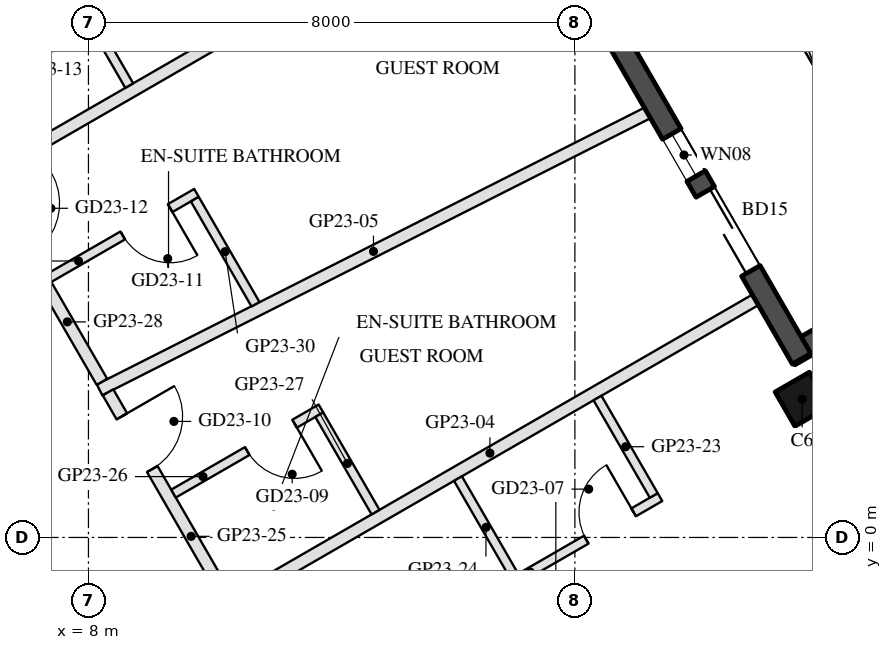
"""IFC4 building model, lengths in metres.
Left out: names, types, materials, properties, quantities, classifications, styles, units other than length and angle.
Written with IfcOpenShell. Run it as: python <this file> out.ifc"""

import sys

from ifc_helpers import new_model, si_unit, direction, frame, frame_2d, origin, origin_2d, place, context, subcontext, project, spatial, rectangle, hollow_rectangle, extrude, boolean, halfspace, element, fill, save


model = new_model("IFC4")
c1 = context("Model", 3, precision=1e-05, world=origin(), true_north=direction((0.0, 1.0)))
c2 = subcontext(c1, "Body", "Model", "MODEL_VIEW")
j1 = project(units=[si_unit("LENGTHUNIT", "METRE"), si_unit("PLANEANGLEUNIT", "RADIAN")], contexts=[c1])
p1 = place(None, origin())
s1 = spatial("IfcSite", under=j1, at=p1, CompositionType="ELEMENT")
p2 = place(p1, origin())
s2 = spatial("IfcBuilding", under=s1, at=p2, CompositionType="ELEMENT")
p3 = place(p2, frame((0.0, 0.0, 250.4)))
s3 = spatial("IfcBuildingStorey", under=s2, at=p3, CompositionType="ELEMENT", Elevation=250.4)
p4 = place(p3, frame((19.738, 2.273, 0.0), z_axis=(0.0, 0.0, 1.0), x_axis=(-0.5, 0.866025403784, 0.0)))
e1 = element("IfcColumn", 1, at=p4, inside=s3, PredefinedType="COLUMN", context=c2, shape_type="SweptSolid", body=[
    boolean("DIFFERENCE", extrude(hollow_rectangle(XDim=0.65, YDim=0.65, WallThickness=0.03, at=origin_2d()), origin(), (0.0, 0.0, 1.0), 3.7), halfspace(frame((0.0, 0.0, 3.66), z_axis=(0.0, 0.0, 1.0), x_axis=(1.0, 0.0, 0.0)), False)),
])
p5 = place(p3, frame((20.588, 3.601, 0.0), z_axis=(0.0, 0.0, 1.0), x_axis=(-0.866005645448, -0.500034220881, 0.0)))
e2 = element("IfcWall", 2, at=p5, inside=s3, PredefinedType="SOLIDWALL", context=c2, shape_type="SweptSolid", body=[
    extrude(rectangle(XDim=1.22, YDim=0.35, at=frame_2d((0.61, 0.0))), origin(), (0.0, 0.0, 1.0), 3.55),
])
p6 = place(p3, frame((19.729, 2.938, 0.0), z_axis=(0.0, 0.0, 1.0), x_axis=(-0.499976430342, 0.866039011305, 0.0)))
e3 = element("IfcWall", 3, at=p6, inside=s3, PredefinedType="SOLIDWALL", context=c2, shape_type="SweptSolid", body=[
    extrude(rectangle(XDim=6.74, YDim=0.35, at=frame_2d((3.37, 0.0))), origin(), (0.0, 0.0, 1.0), 3.55),
])
p7 = place(p6, frame((1.67, 0.0, 0.0)))
e4 = element("IfcOpeningElement", 4, at=p7, cuts=e3, PredefinedType="OPENING", context=c2, shape_type="SweptSolid", body=[
    extrude(rectangle(XDim=1.5, YDim=2.4, at=frame_2d((0.75, 1.2))), frame((0.0, 0.185, 0.0), z_axis=(0.0, -1.0, 0.0), x_axis=(1.0, 0.0, 0.0)), (0.0, 0.0, 1.0), 0.37),
])
p8 = place(p6, frame((3.47, 0.0, 0.3)))
e5 = element("IfcOpeningElement", 5, at=p8, cuts=e3, PredefinedType="OPENING", context=c2, shape_type="SweptSolid", body=[
    extrude(rectangle(XDim=0.8, YDim=2.65, at=frame_2d((0.4, 1.325))), frame((0.0, 0.185, 0.0), z_axis=(0.0, -1.0, 0.0), x_axis=(1.0, 0.0, 0.0)), (0.0, 0.0, 1.0), 0.37),
])
p9 = place(p3, frame((18.968, 3.907, 0.0), z_axis=(0.0, 0.0, 1.0), x_axis=(-0.866022637375, -0.500004791531, 0.0)))
e6 = element("IfcWall", 6, at=p9, inside=s3, PredefinedType="PARTITIONING", context=c2, shape_type="SweptSolid", body=[
    extrude(rectangle(XDim=10.08, YDim=0.2, at=frame_2d((5.04, 0.0))), origin(), (0.0, 0.0, 1.0), 3.1),
])
p10 = place(p3, frame((17.192, 6.982, 0.0), z_axis=(0.0, 0.0, 1.0), x_axis=(-0.892469554868, -0.451107629766, 0.0)))
e7 = element("IfcWall", 7, at=p10, inside=s3, PredefinedType="PARTITIONING", context=c2, shape_type="SweptSolid", body=[
    extrude(rectangle(XDim=10.096, YDim=0.2, at=frame_2d((5.048, 0.0))), origin(), (0.0, 0.0, 1.0), 3.1),
])
p11 = place(p3, frame((15.697, 11.372, 0.0), z_axis=(0.0, 0.0, 1.0), x_axis=(-0.866027479907, -0.499996404033, 0.0)))
e8 = element("IfcWall", 8, at=p11, inside=s3, PredefinedType="PARTITIONING", context=c2, shape_type="SweptSolid", body=[
    extrude(rectangle(XDim=10.98, YDim=0.2, at=frame_2d((5.49, 0.0))), origin(), (0.0, 0.0, 1.0), 3.1),
])
p12 = place(p3, frame((14.974, -0.737, 0.0), z_axis=(0.0, 0.0, 1.0), x_axis=(0.866018616679, 0.500011755427, 0.0)))
e9 = element("IfcWall", 9, at=p12, inside=s3, PredefinedType="PARTITIONING", context=c2, shape_type="SweptSolid", body=[
    extrude(rectangle(XDim=2.8, YDim=0.15, at=frame_2d((1.4, 0.0))), origin(), (0.0, 0.0, 1.0), 3.55),
])
p13 = place(p12, frame((1.4, 0.0, 0.0)))
e10 = element("IfcOpeningElement", 10, at=p13, cuts=e9, PredefinedType="OPENING", context=c2, shape_type="SweptSolid", body=[
    extrude(rectangle(XDim=0.9, YDim=2.1, at=frame_2d((0.45, 1.05))), frame((0.0, 0.085, 0.0), z_axis=(0.0, -1.0, 0.0), x_axis=(1.0, 0.0, 0.0)), (0.0, 0.0, 1.0), 0.17),
])
p14 = place(p3, frame((17.297, 0.691, 0.0), z_axis=(0.0, 0.0, 1.0), x_axis=(-0.499985172903, 0.866033964044, 0.0)))
e11 = element("IfcWall", 11, at=p14, inside=s3, PredefinedType="PARTITIONING", context=c2, shape_type="SweptSolid", body=[
    extrude(rectangle(XDim=1.85, YDim=0.15, at=frame_2d((0.925, 0.0))), origin(), (0.0, 0.0, 1.0), 2.95),
])
p15 = place(p3, frame((15.002, -0.634, 0.0), z_axis=(0.0, 0.0, 1.0), x_axis=(-0.500042316284, 0.866000971088, 0.0)))
e12 = element("IfcWall", 12, at=p15, inside=s3, PredefinedType="PARTITIONING", context=c2, shape_type="SweptSolid", body=[
    extrude(rectangle(XDim=1.85, YDim=0.15, at=frame_2d((0.925, 0.0))), origin(), (0.0, 0.0, 1.0), 2.95),
])
p16 = place(p3, frame((8.322, 2.386, 0.0), z_axis=(0.0, 0.0, 1.0), x_axis=(0.499998439657, -0.866026304647, 0.0)))
e13 = element("IfcWall", 13, at=p16, inside=s3, PredefinedType="PARTITIONING", context=c2, shape_type="SweptSolid", body=[
    extrude(rectangle(XDim=3.905, YDim=0.2, at=frame_2d((1.953, 0.0))), origin(), (0.0, 0.0, 1.0), 2.95),
])
p17 = place(p16, frame((0.455, 0.0, 0.0)))
e14 = element("IfcOpeningElement", 14, at=p17, cuts=e13, PredefinedType="OPENING", context=c2, shape_type="SweptSolid", body=[
    extrude(rectangle(XDim=1.0, YDim=2.1, at=frame_2d((0.5, 1.05))), frame((0.0, 0.11, 0.0), z_axis=(0.0, -1.0, 0.0), x_axis=(1.0, 0.0, 0.0)), (0.0, 0.0, 1.0), 0.22),
])
p18 = place(p3, frame((11.823, 2.121, 0.0), z_axis=(0.0, 0.0, 1.0), x_axis=(-0.866034573852, -0.49998411664, 0.0)))
e15 = element("IfcWall", 15, at=p18, inside=s3, PredefinedType="PARTITIONING", context=c2, shape_type="SweptSolid", body=[
    extrude(rectangle(XDim=2.8, YDim=0.15, at=frame_2d((1.4, 0.0))), origin(), (0.0, 0.0, 1.0), 2.95),
])
p19 = place(p18, frame((0.5, 0.0, 0.0)))
e16 = element("IfcOpeningElement", 16, at=p19, cuts=e15, PredefinedType="OPENING", context=c2, shape_type="SweptSolid", body=[
    extrude(rectangle(XDim=0.9, YDim=2.1, at=frame_2d((0.45, 1.05))), frame((0.0, 0.085, 0.0), z_axis=(0.0, -1.0, 0.0), x_axis=(1.0, 0.0, 0.0)), (0.0, 0.0, 1.0), 0.17),
])
p20 = place(p3, frame((12.721, 0.416, 0.0), z_axis=(0.0, 0.0, 1.0), x_axis=(-0.499985172903, 0.866033964044, 0.0)))
e17 = element("IfcWall", 17, at=p20, inside=s3, PredefinedType="PARTITIONING", context=c2, shape_type="SweptSolid", body=[
    extrude(rectangle(XDim=1.85, YDim=0.15, at=frame_2d((0.925, 0.0))), origin(), (0.0, 0.0, 1.0), 3.55),
])
p21 = place(p3, frame((6.325, 5.845, 0.0), z_axis=(0.0, 0.0, 1.0), x_axis=(0.499973105789, -0.866040930607, 0.0)))
e18 = element("IfcWall", 18, at=p21, inside=s3, PredefinedType="PARTITIONING", context=c2, shape_type="SweptSolid", body=[
    extrude(rectangle(XDim=3.794, YDim=0.2, at=frame_2d((1.897, 0.0))), origin(), (0.0, 0.0, 1.0), 2.95),
])
p22 = place(p21, frame((0.403, 0.0, 0.0)))
e19 = element("IfcOpeningElement", 19, at=p22, cuts=e18, PredefinedType="OPENING", context=c2, shape_type="SweptSolid", body=[
    extrude(rectangle(XDim=1.0, YDim=2.1, at=frame_2d((0.5, 1.05))), frame((0.0, 0.11, 0.0), z_axis=(0.0, -1.0, 0.0), x_axis=(1.0, 0.0, 0.0)), (0.0, 0.0, 1.0), 0.22),
])
p23 = place(p3, frame((9.776, 5.667, 0.0), z_axis=(0.0, 0.0, 1.0), x_axis=(-0.866034573852, -0.49998411664, 0.0)))
e20 = element("IfcWall", 20, at=p23, inside=s3, PredefinedType="PARTITIONING", context=c2, shape_type="SweptSolid", body=[
    extrude(rectangle(XDim=2.8, YDim=0.15, at=frame_2d((1.4, 0.0))), origin(), (0.0, 0.0, 1.0), 2.95),
])
p24 = place(p23, frame((0.5, 0.0, 0.0)))
e21 = element("IfcOpeningElement", 21, at=p24, cuts=e20, PredefinedType="OPENING", context=c2, shape_type="SweptSolid", body=[
    extrude(rectangle(XDim=0.9, YDim=2.1, at=frame_2d((0.45, 1.05))), frame((0.0, 0.085, 0.0), z_axis=(0.0, -1.0, 0.0), x_axis=(1.0, 0.0, 0.0)), (0.0, 0.0, 1.0), 0.17),
])
p25 = place(p3, frame((10.747, 3.836, 0.0), z_axis=(0.0, 0.0, 1.0), x_axis=(-0.499980071345, 0.866036909293, 0.0)))
e22 = element("IfcWall", 22, at=p25, inside=s3, PredefinedType="PARTITIONING", context=c2, shape_type="SweptSolid", body=[
    extrude(rectangle(XDim=1.996, YDim=0.15, at=frame_2d((0.998, 0.0))), origin(), (0.0, 0.0, 1.0), 2.95),
])
p26 = place(p3, frame((7.774, 9.136, 0.0), z_axis=(0.0, 0.0, 1.0), x_axis=(-0.866056369097, -0.49994636267, 0.0)))
e23 = element("IfcWall", 23, at=p26, inside=s3, PredefinedType="PARTITIONING", context=c2, shape_type="SweptSolid", body=[
    extrude(rectangle(XDim=2.8, YDim=0.15, at=frame_2d((1.4, 0.0))), origin(), (0.0, 0.0, 1.0), 2.95),
])
p27 = place(p26, frame((0.5, 0.0, 0.0)))
e24 = element("IfcOpeningElement", 24, at=p27, cuts=e23, PredefinedType="OPENING", context=c2, shape_type="SweptSolid", body=[
    extrude(rectangle(XDim=0.9, YDim=2.1, at=frame_2d((0.45, 1.05))), frame((0.0, 0.085, 0.0), z_axis=(0.0, -1.0, 0.0), x_axis=(1.0, 0.0, 0.0)), (0.0, 0.0, 1.0), 0.17),
])
p28 = place(p3, frame((8.671, 7.431, 0.0), z_axis=(0.0, 0.0, 1.0), x_axis=(-0.500042316284, 0.866000971088, 0.0)))
e25 = element("IfcWall", 25, at=p28, inside=s3, PredefinedType="PARTITIONING", context=c2, shape_type="SweptSolid", body=[
    extrude(rectangle(XDim=1.85, YDim=0.15, at=frame_2d((0.925, 0.0))), origin(), (0.0, 0.0, 1.0), 2.95),
])
p29 = place(p7, frame((1.5, 0.0, 0.0), z_axis=(0.0, 0.0, 1.0), x_axis=(-1.0, 0.0, 0.0)))
e26 = element("IfcDoor", 26, at=p29, inside=s3, OperationType="SLIDING_TO_LEFT", PredefinedType="DOOR", context=c2, shape_type="SweptSolid", body=[
    extrude(rectangle(XDim=1.5, YDim=2.4, at=frame_2d((0.75, 1.2))), frame((0.0, 0.025, 0.0), z_axis=(0.0, -1.0, 0.0), x_axis=(1.0, 0.0, 0.0)), (0.0, 0.0, 1.0), 0.05),
])
fill(e4, e26)
p30 = place(p8, origin())
e27 = element("IfcWindow", 27, at=p30, inside=s3, PartitioningType="SINGLE_PANEL", PredefinedType="WINDOW", context=c2, shape_type="SweptSolid", body=[
    extrude(rectangle(XDim=0.8, YDim=2.65, at=frame_2d((0.4, 1.325))), frame((0.0, 0.03, 0.0), z_axis=(0.0, -1.0, 0.0), x_axis=(1.0, 0.0, 0.0)), (0.0, 0.0, 1.0), 0.06),
])
fill(e5, e27)
p31 = place(p13, origin())
e28 = element("IfcDoor", 28, at=p31, inside=s3, OperationType="SINGLE_SWING_RIGHT", PredefinedType="DOOR", context=c2, shape_type="SweptSolid", body=[
    extrude(rectangle(XDim=0.9, YDim=2.1, at=frame_2d((0.45, 1.05))), frame((0.0, 0.025, 0.0), z_axis=(0.0, -1.0, 0.0), x_axis=(1.0, 0.0, 0.0)), (0.0, 0.0, 1.0), 0.05),
])
fill(e10, e28)
p32 = place(p19, origin())
e29 = element("IfcDoor", 29, at=p32, inside=s3, OperationType="SINGLE_SWING_LEFT", PredefinedType="DOOR", context=c2, shape_type="SweptSolid", body=[
    extrude(rectangle(XDim=0.9, YDim=2.1, at=frame_2d((0.45, 1.05))), frame((0.0, 0.025, 0.0), z_axis=(0.0, -1.0, 0.0), x_axis=(1.0, 0.0, 0.0)), (0.0, 0.0, 1.0), 0.05),
])
fill(e16, e29)
p33 = place(p17, origin())
e30 = element("IfcDoor", 30, at=p33, inside=s3, OperationType="SINGLE_SWING_LEFT", PredefinedType="DOOR", context=c2, shape_type="SweptSolid", body=[
    extrude(rectangle(XDim=1.0, YDim=2.1, at=frame_2d((0.5, 1.05))), frame((0.0, 0.025, 0.0), z_axis=(0.0, -1.0, 0.0), x_axis=(1.0, 0.0, 0.0)), (0.0, 0.0, 1.0), 0.05),
])
fill(e14, e30)
p34 = place(p24, origin())
e31 = element("IfcDoor", 31, at=p34, inside=s3, OperationType="SINGLE_SWING_LEFT", PredefinedType="DOOR", context=c2, shape_type="SweptSolid", body=[
    extrude(rectangle(XDim=0.9, YDim=2.1, at=frame_2d((0.45, 1.05))), frame((0.0, 0.025, 0.0), z_axis=(0.0, -1.0, 0.0), x_axis=(1.0, 0.0, 0.0)), (0.0, 0.0, 1.0), 0.05),
])
fill(e21, e31)
save(model, sys.argv[1])
